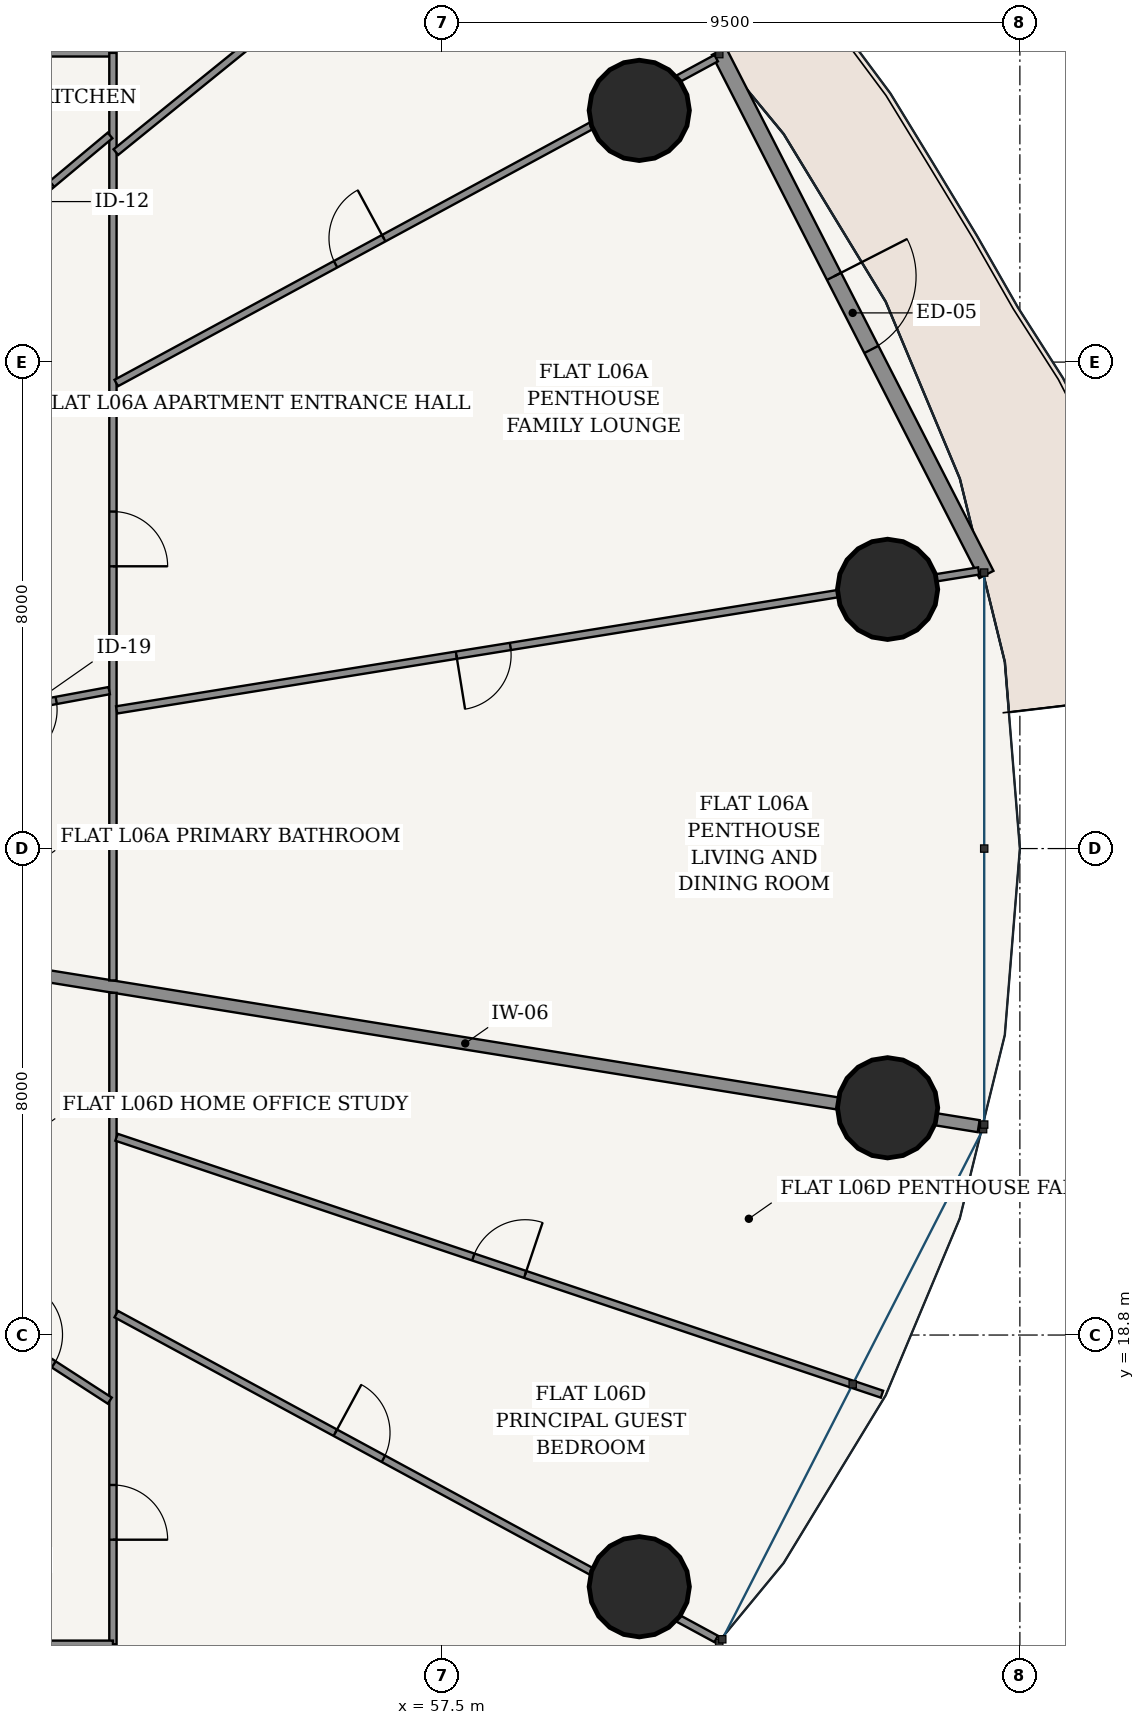
"""IFC4 building model, lengths in metres.
Left out: names, types, materials, properties, quantities, classifications, styles, units other than length and angle.
Written with IfcOpenShell. Run it as: python <this file> out.ifc"""

import sys

from ifc_helpers import new_model, si_unit, direction, frame, frame_2d, origin, origin_2d, place, context, subcontext, project, spatial, rectangle, hollow_circle, extrude, source, transform, mapped, element, fill, save


model = new_model("IFC4")
c1 = context("Model", 3, precision=1e-05, world=origin(), true_north=direction((-0.2419218956, 0.970295726276)))
c2 = subcontext(c1, "Body", "Model", "MODEL_VIEW")
j1 = project(units=[si_unit("LENGTHUNIT", "METRE"), si_unit("PLANEANGLEUNIT", "RADIAN")], contexts=[c1])
p1 = place(None, origin())
s1 = spatial("IfcSite", under=j1, at=p1, CompositionType="ELEMENT")
p2 = place(p1, origin())
s2 = spatial("IfcBuilding", under=s1, at=p2, CompositionType="ELEMENT")
p3 = place(p2, frame((0.0, 0.0, 27.6)))
s3 = spatial("IfcBuildingStorey", under=s2, at=p3, CompositionType="ELEMENT", Elevation=27.6)
for number, where, z_axis, x_axis in (
    (1, (64.824, 31.063, 0.0), (0.0, 0.0, 1.0), (1.0, 0.0, 0.0)),
    (2, (60.741, 38.939, 0.0), (0.0, 0.0, 1.0), (1.0, 0.0, 0.0)),
    (3, (60.741, 14.661, 0.0), (0.0, 0.0, 1.0), (1.0, 0.0, 0.0)),
    (4, (64.824, 22.537, 0.0), (0.0, 0.0, 1.0), (1.0, 0.0, 0.0)),
):
    element("IfcColumn", number, at=place(p3, frame(where, z_axis=z_axis, x_axis=x_axis)), inside=s3, PredefinedType="COLUMN", context=c2, shape_type="SweptSolid", body=[
        extrude(hollow_circle(Radius=0.825, WallThickness=0.05, at=origin_2d()), origin(), (0.0, 0.0, 1.0), 3.6),
    ])
p4 = place(p3, frame((66.45, 31.308, 0.0), z_axis=(0.0, 0.0, 1.0), x_axis=(-0.45523081716, 0.890373462715, 0.0)))
e5 = element("IfcWall", 5, at=p4, inside=s3, PredefinedType="SOLIDWALL", context=c2, shape_type="SweptSolid", body=[
    extrude(rectangle(XDim=9.662, YDim=0.26, at=frame_2d((4.831, 0.0))), origin(), (0.0, 0.0, 1.0), 3.32),
])
p5 = place(p4, frame((4.156, 0.0, 0.0)))
e6 = element("IfcOpeningElement", 6, at=p5, cuts=e5, PredefinedType="OPENING", context=c2, shape_type="SweptSolid", body=[
    extrude(rectangle(XDim=1.35, YDim=2.2, at=frame_2d((0.675, 1.1))), frame((0.0, 0.14, 0.0), z_axis=(0.0, -1.0, 0.0), x_axis=(1.0, 0.0, 0.0)), (0.0, 0.0, 1.0), 0.28),
])
p6 = place(p3, frame((49.435, 24.957, 0.0), z_axis=(0.0, 0.0, 1.0), x_axis=(0.987258195973, -0.159126536076, 0.0)))
e7 = element("IfcWall", 7, at=p6, inside=s3, PredefinedType="PARTITIONING", context=c2, shape_type="SweptSolid", body=[
    extrude(rectangle(XDim=17.105, YDim=0.2, at=frame_2d((8.553, 0.0))), origin(), (0.0, 0.0, 1.0), 2.688),
])
p7 = place(p3, frame((44.791, 39.885, 0.0), z_axis=(0.0, 0.0, 1.0), x_axis=(1.0, 0.0, 0.0)))
e8 = element("IfcWall", 8, at=p7, inside=s3, PredefinedType="PARTITIONING", context=c2, shape_type="SweptSolid", body=[
    extrude(rectangle(XDim=7.294, YDim=0.12, at=frame_2d((3.647, 0.0))), origin(), (0.0, 0.0, 1.0), 2.688),
])
p8 = place(p7, frame((1.705, 0.0, 0.0)))
e9 = element("IfcOpeningElement", 9, at=p8, cuts=e8, PredefinedType="OPENING", context=c2, shape_type="SweptSolid", body=[
    extrude(rectangle(XDim=0.9, YDim=2.15, at=frame_2d((0.45, 1.075))), frame((0.0, 0.07, 0.0), z_axis=(0.0, -1.0, 0.0), x_axis=(1.0, 0.0, 0.0)), (0.0, 0.0, 1.0), 0.14),
])
p9 = place(p3, frame((52.085, 39.885, 0.0), z_axis=(0.0, 0.0, 1.0), x_axis=(0.0, -1.0, 0.0)))
e10 = element("IfcWall", 10, at=p9, inside=s3, PredefinedType="PARTITIONING", context=c2, shape_type="SweptSolid", body=[
    extrude(rectangle(XDim=15.253, YDim=0.12, at=frame_2d((7.627, 0.0))), origin(), (0.0, 0.0, 1.0), 2.688),
])
p10 = place(p9, frame((7.543, 0.0, 0.0)))
e11 = element("IfcOpeningElement", 11, at=p10, cuts=e10, PredefinedType="OPENING", context=c2, shape_type="SweptSolid", body=[
    extrude(rectangle(XDim=0.9, YDim=2.15, at=frame_2d((0.45, 1.075))), frame((0.0, 0.07, 0.0), z_axis=(0.0, -1.0, 0.0), x_axis=(1.0, 0.0, 0.0)), (0.0, 0.0, 1.0), 0.14),
])
p11 = place(p3, frame((52.146, 29.08, 0.0), z_axis=(0.0, 0.0, 1.0), x_axis=(0.987255773689, 0.159141563768, 0.0)))
e12 = element("IfcWall", 12, at=p11, inside=s3, PredefinedType="PARTITIONING", context=c2, shape_type="SweptSolid", body=[
    extrude(rectangle(XDim=14.359, YDim=0.12, at=frame_2d((7.18, 0.0))), origin(), (0.0, 0.0, 1.0), 2.688),
])
p12 = place(p11, frame((5.659, 0.0, 0.0)))
e13 = element("IfcOpeningElement", 13, at=p12, cuts=e12, PredefinedType="OPENING", context=c2, shape_type="SweptSolid", body=[
    extrude(rectangle(XDim=0.9, YDim=2.15, at=frame_2d((0.45, 1.075))), frame((0.0, 0.07, 0.0), z_axis=(0.0, -1.0, 0.0), x_axis=(1.0, 0.0, 0.0)), (0.0, 0.0, 1.0), 0.14),
])
p13 = place(p3, frame((52.139, 34.456, 0.0), z_axis=(0.0, 0.0, 1.0), x_axis=(0.879372452045, 0.476134529922, 0.0)))
e14 = element("IfcWall", 14, at=p13, inside=s3, PredefinedType="PARTITIONING", context=c2, shape_type="SweptSolid", body=[
    extrude(rectangle(XDim=11.219, YDim=0.12, at=frame_2d((5.61, 0.0))), origin(), (0.0, 0.0, 1.0), 2.688),
])
p14 = place(p13, frame((4.102, 0.0, 0.0)))
e15 = element("IfcOpeningElement", 15, at=p14, cuts=e14, PredefinedType="OPENING", context=c2, shape_type="SweptSolid", body=[
    extrude(rectangle(XDim=0.9, YDim=2.15, at=frame_2d((0.45, 1.075))), frame((0.0, 0.07, 0.0), z_axis=(0.0, -1.0, 0.0), x_axis=(1.0, 0.0, 0.0)), (0.0, 0.0, 1.0), 0.14),
])
p15 = place(p3, frame((52.133, 38.253, 0.0), z_axis=(0.0, 0.0, 1.0), x_axis=(0.776936623447, 0.629578814087, 0.0)))
e16 = element("IfcWall", 16, at=p15, inside=s3, PredefinedType="PARTITIONING", context=c2, shape_type="SweptSolid", body=[
    extrude(rectangle(XDim=8.136, YDim=0.12, at=frame_2d((4.068, 0.0))), origin(), (0.0, 0.0, 1.0), 2.762),
])
p16 = place(p15, frame((3.618, 0.0, 0.0)))
e17 = element("IfcOpeningElement", 17, at=p16, cuts=e16, PredefinedType="OPENING", context=c2, shape_type="SweptSolid", body=[
    extrude(rectangle(XDim=0.9, YDim=2.15, at=frame_2d((0.45, 1.075))), frame((0.0, 0.07, 0.0), z_axis=(0.0, -1.0, 0.0), x_axis=(1.0, 0.0, 0.0)), (0.0, 0.0, 1.0), 0.14),
])
p17 = place(p3, frame((48.829, 39.933, 0.0), z_axis=(0.0, 0.0, 1.0), x_axis=(0.636192172227, 0.771530634516, 0.0)))
e18 = element("IfcWall", 18, at=p17, inside=s3, PredefinedType="PARTITIONING", context=c2, shape_type="SweptSolid", body=[
    extrude(rectangle(XDim=8.186, YDim=0.12, at=frame_2d((4.093, 0.0))), origin(), (0.0, 0.0, 1.0), 2.688),
])
p18 = place(p3, frame((49.435, 28.918, 0.0), z_axis=(0.0, 0.0, 1.0), x_axis=(0.983277085422, 0.182115823818, 0.0)))
e19 = element("IfcWall", 19, at=p18, inside=s3, PredefinedType="PARTITIONING", context=c2, shape_type="SweptSolid", body=[
    extrude(rectangle(XDim=2.633, YDim=0.12, at=frame_2d((1.316, 0.0))), origin(), (0.0, 0.0, 1.0), 3.32),
])
p19 = place(p18, frame((0.886, 0.0, 0.0)))
e20 = element("IfcOpeningElement", 20, at=p19, cuts=e19, PredefinedType="OPENING", context=c2, shape_type="SweptSolid", body=[
    extrude(rectangle(XDim=0.86, YDim=2.15, at=frame_2d((0.43, 1.075))), frame((0.0, 0.07, 0.0), z_axis=(0.0, -1.0, 0.0), x_axis=(1.0, 0.0, 0.0)), (0.0, 0.0, 1.0), 0.14),
])
p20 = place(p3, frame((49.435, 36.353, 0.0), z_axis=(0.0, 0.0, 1.0), x_axis=(0.76742398833, 0.641139939589, 0.0)))
e21 = element("IfcWall", 21, at=p20, inside=s3, PredefinedType="PARTITIONING", context=c2, shape_type="SweptSolid", body=[
    extrude(rectangle(XDim=3.391, YDim=0.12, at=frame_2d((1.695, 0.0))), origin(), (0.0, 0.0, 1.0), 2.999),
])
p21 = place(p20, frame((1.246, 0.0, 0.0)))
e22 = element("IfcOpeningElement", 22, at=p21, cuts=e21, PredefinedType="OPENING", context=c2, shape_type="SweptSolid", body=[
    extrude(rectangle(XDim=0.9, YDim=2.15, at=frame_2d((0.45, 1.075))), frame((0.0, 0.07, 0.0), z_axis=(0.0, -1.0, 0.0), x_axis=(1.0, 0.0, 0.0)), (0.0, 0.0, 1.0), 0.14),
])
p22 = place(p3, frame((52.085, 24.428, 0.0), z_axis=(0.0, 0.0, 1.0), x_axis=(0.0, -1.0, 0.0)))
e23 = element("IfcWall", 23, at=p22, inside=s3, PredefinedType="PARTITIONING", context=c2, shape_type="SweptSolid", body=[
    extrude(rectangle(XDim=10.713, YDim=0.12, at=frame_2d((5.356, 0.0))), origin(), (0.0, 0.0, 1.0), 2.688),
])
p23 = place(p22, frame((8.094, 0.0, 0.0)))
e24 = element("IfcOpeningElement", 24, at=p23, cuts=e23, PredefinedType="OPENING", context=c2, shape_type="SweptSolid", body=[
    extrude(rectangle(XDim=0.9, YDim=2.15, at=frame_2d((0.45, 1.075))), frame((0.0, 0.07, 0.0), z_axis=(0.0, -1.0, 0.0), x_axis=(1.0, 0.0, 0.0)), (0.0, 0.0, 1.0), 0.14),
])
p24 = place(p3, frame((52.085, 13.715, 0.0), z_axis=(0.0, 0.0, 1.0), x_axis=(-1.0, 0.0, 0.0)))
e25 = element("IfcWall", 25, at=p24, inside=s3, PredefinedType="PARTITIONING", context=c2, shape_type="SweptSolid", body=[
    extrude(rectangle(XDim=17.195, YDim=0.12, at=frame_2d((8.597, 0.0))), origin(), (0.0, 0.0, 1.0), 2.688),
])
p25 = place(p24, frame((9.191, 0.0, 0.0)))
e26 = element("IfcOpeningElement", 26, at=p25, cuts=e25, PredefinedType="OPENING", context=c2, shape_type="SweptSolid", body=[
    extrude(rectangle(XDim=0.9, YDim=2.15, at=frame_2d((0.45, 1.075))), frame((0.0, 0.07, 0.0), z_axis=(0.0, -1.0, 0.0), x_axis=(1.0, 0.0, 0.0)), (0.0, 0.0, 1.0), 0.14),
])
p26 = place(p3, frame((48.829, 13.667, 0.0), z_axis=(0.0, 0.0, 1.0), x_axis=(0.636177533893, -0.771542704826, 0.0)))
e27 = element("IfcWall", 27, at=p26, inside=s3, PredefinedType="PARTITIONING", context=c2, shape_type="SweptSolid", body=[
    extrude(rectangle(XDim=8.187, YDim=0.12, at=frame_2d((4.093, 0.0))), origin(), (0.0, 0.0, 1.0), 2.688),
])
p27 = place(p3, frame((52.139, 19.144, 0.0), z_axis=(0.0, 0.0, 1.0), x_axis=(0.879372452045, -0.476134529922, 0.0)))
e28 = element("IfcWall", 28, at=p27, inside=s3, PredefinedType="PARTITIONING", context=c2, shape_type="SweptSolid", body=[
    extrude(rectangle(XDim=11.219, YDim=0.12, at=frame_2d((5.61, 0.0))), origin(), (0.0, 0.0, 1.0), 2.688),
])
p28 = place(p27, frame((4.097, 0.0, 0.0)))
e29 = element("IfcOpeningElement", 29, at=p28, cuts=e28, PredefinedType="OPENING", context=c2, shape_type="SweptSolid", body=[
    extrude(rectangle(XDim=0.9, YDim=2.15, at=frame_2d((0.45, 1.075))), frame((0.0, 0.07, 0.0), z_axis=(0.0, -1.0, 0.0), x_axis=(1.0, 0.0, 0.0)), (0.0, 0.0, 1.0), 0.14),
])
p29 = place(p3, frame((52.144, 22.052, 0.0), z_axis=(0.0, 0.0, 1.0), x_axis=(0.948023034133, -0.318201707653, 0.0)))
e30 = element("IfcWall", 30, at=p29, inside=s3, PredefinedType="PARTITIONING", context=c2, shape_type="SweptSolid", body=[
    extrude(rectangle(XDim=13.279, YDim=0.12, at=frame_2d((6.639, 0.0))), origin(), (0.0, 0.0, 1.0), 2.762),
])
p30 = place(p29, frame((6.189, 0.0, 0.0)))
e31 = element("IfcOpeningElement", 31, at=p30, cuts=e30, PredefinedType="OPENING", context=c2, shape_type="SweptSolid", body=[
    extrude(rectangle(XDim=0.9, YDim=2.15, at=frame_2d((0.45, 1.075))), frame((0.0, 0.07, 0.0), z_axis=(0.0, -1.0, 0.0), x_axis=(1.0, 0.0, 0.0)), (0.0, 0.0, 1.0), 0.14),
])
p31 = place(p3, frame((49.435, 19.402, 0.0), z_axis=(0.0, 0.0, 1.0), x_axis=(0.839582858019, -0.543231649042, 0.0)))
e32 = element("IfcWall", 32, at=p31, inside=s3, PredefinedType="PARTITIONING", context=c2, shape_type="SweptSolid", body=[
    extrude(rectangle(XDim=3.094, YDim=0.12, at=frame_2d((1.547, 0.0))), origin(), (0.0, 0.0, 1.0), 3.32),
])
p32 = place(p31, frame((1.097, 0.0, 0.0)))
e33 = element("IfcOpeningElement", 33, at=p32, cuts=e32, PredefinedType="OPENING", context=c2, shape_type="SweptSolid", body=[
    extrude(rectangle(XDim=0.9, YDim=2.15, at=frame_2d((0.45, 1.075))), frame((0.0, 0.07, 0.0), z_axis=(0.0, -1.0, 0.0), x_axis=(1.0, 0.0, 0.0)), (0.0, 0.0, 1.0), 0.14),
])
m1 = source(origin(), c2, "Body", "SweptSolid", [
    extrude(rectangle(XDim=1.35, YDim=2.2, at=frame_2d((0.675, 1.1))), frame((0.0, 0.025, 0.0), z_axis=(0.0, -1.0, 0.0), x_axis=(1.0, 0.0, 0.0)), (0.0, 0.0, 1.0), 0.05),
])
p33 = place(p5, frame((1.35, 0.0, 0.0), z_axis=(0.0, 0.0, 1.0), x_axis=(-1.0, 0.0, 0.0)))
e34 = element("IfcDoor", 34, at=p33, inside=s3, OperationType="SINGLE_SWING_LEFT", PredefinedType="DOOR", context=c2, shape_type="MappedRepresentation", body=[
    mapped(m1, transform((0.0, 0.0, 0.0), scale=1.0)),
])
fill(e6, e34)
m2 = source(origin(), c2, "Body", "SweptSolid", [
    extrude(rectangle(XDim=0.86, YDim=2.15, at=frame_2d((0.43, 1.075))), frame((0.0, 0.025, 0.0), z_axis=(0.0, -1.0, 0.0), x_axis=(1.0, 0.0, 0.0)), (0.0, 0.0, 1.0), 0.05),
])
p34 = place(p19, frame((0.86, 0.0, 0.0), z_axis=(0.0, 0.0, 1.0), x_axis=(-1.0, 0.0, 0.0)))
e35 = element("IfcDoor", 35, at=p34, inside=s3, OperationType="SINGLE_SWING_RIGHT", PredefinedType="DOOR", context=c2, shape_type="MappedRepresentation", body=[
    mapped(m2, transform((0.0, 0.0, 0.0), scale=1.0)),
])
fill(e20, e35)
m3 = source(origin(), c2, "Body", "SweptSolid", [
    extrude(rectangle(XDim=0.9, YDim=2.15, at=frame_2d((0.45, 1.075))), frame((0.0, 0.025, 0.0), z_axis=(0.0, -1.0, 0.0), x_axis=(1.0, 0.0, 0.0)), (0.0, 0.0, 1.0), 0.05),
])
p35 = place(p21, origin())
e36 = element("IfcDoor", 36, at=p35, inside=s3, OperationType="SINGLE_SWING_LEFT", PredefinedType="DOOR", context=c2, shape_type="MappedRepresentation", body=[
    mapped(m3, transform((0.0, 0.0, 0.0), scale=1.0)),
])
fill(e22, e36)
p36 = place(p10, origin())
e37 = element("IfcDoor", 37, at=p36, inside=s3, OperationType="SINGLE_SWING_RIGHT", PredefinedType="DOOR", context=c2, shape_type="MappedRepresentation", body=[
    mapped(m3, transform((0.0, 0.0, 0.0), scale=1.0)),
])
fill(e11, e37)
p37 = place(p14, origin())
e38 = element("IfcDoor", 38, at=p37, inside=s3, OperationType="SINGLE_SWING_RIGHT", PredefinedType="DOOR", context=c2, shape_type="MappedRepresentation", body=[
    mapped(m3, transform((0.0, 0.0, 0.0), scale=1.0)),
])
fill(e15, e38)
p38 = place(p12, frame((0.9, 0.0, 0.0), z_axis=(0.0, 0.0, 1.0), x_axis=(-1.0, 0.0, 0.0)))
e39 = element("IfcDoor", 39, at=p38, inside=s3, OperationType="SINGLE_SWING_RIGHT", PredefinedType="DOOR", context=c2, shape_type="MappedRepresentation", body=[
    mapped(m3, transform((0.0, 0.0, 0.0), scale=1.0)),
])
fill(e13, e39)
p39 = place(p23, origin())
e40 = element("IfcDoor", 40, at=p39, inside=s3, OperationType="SINGLE_SWING_RIGHT", PredefinedType="DOOR", context=c2, shape_type="MappedRepresentation", body=[
    mapped(m3, transform((0.0, 0.0, 0.0), scale=1.0)),
])
fill(e24, e40)
p40 = place(p32, origin())
e41 = element("IfcDoor", 41, at=p40, inside=s3, OperationType="SINGLE_SWING_LEFT", PredefinedType="DOOR", context=c2, shape_type="MappedRepresentation", body=[
    mapped(m3, transform((0.0, 0.0, 0.0), scale=1.0)),
])
fill(e33, e41)
p41 = place(p28, origin())
e42 = element("IfcDoor", 42, at=p41, inside=s3, OperationType="SINGLE_SWING_LEFT", PredefinedType="DOOR", context=c2, shape_type="MappedRepresentation", body=[
    mapped(m3, transform((0.0, 0.0, 0.0), scale=1.0)),
])
fill(e29, e42)
p42 = place(p30, origin())
e43 = element("IfcDoor", 43, at=p42, inside=s3, OperationType="SINGLE_SWING_RIGHT", PredefinedType="DOOR", context=c2, shape_type="MappedRepresentation", body=[
    mapped(m3, transform((0.0, 0.0, 0.0), scale=1.0)),
])
fill(e31, e43)
save(model, sys.argv[1])
